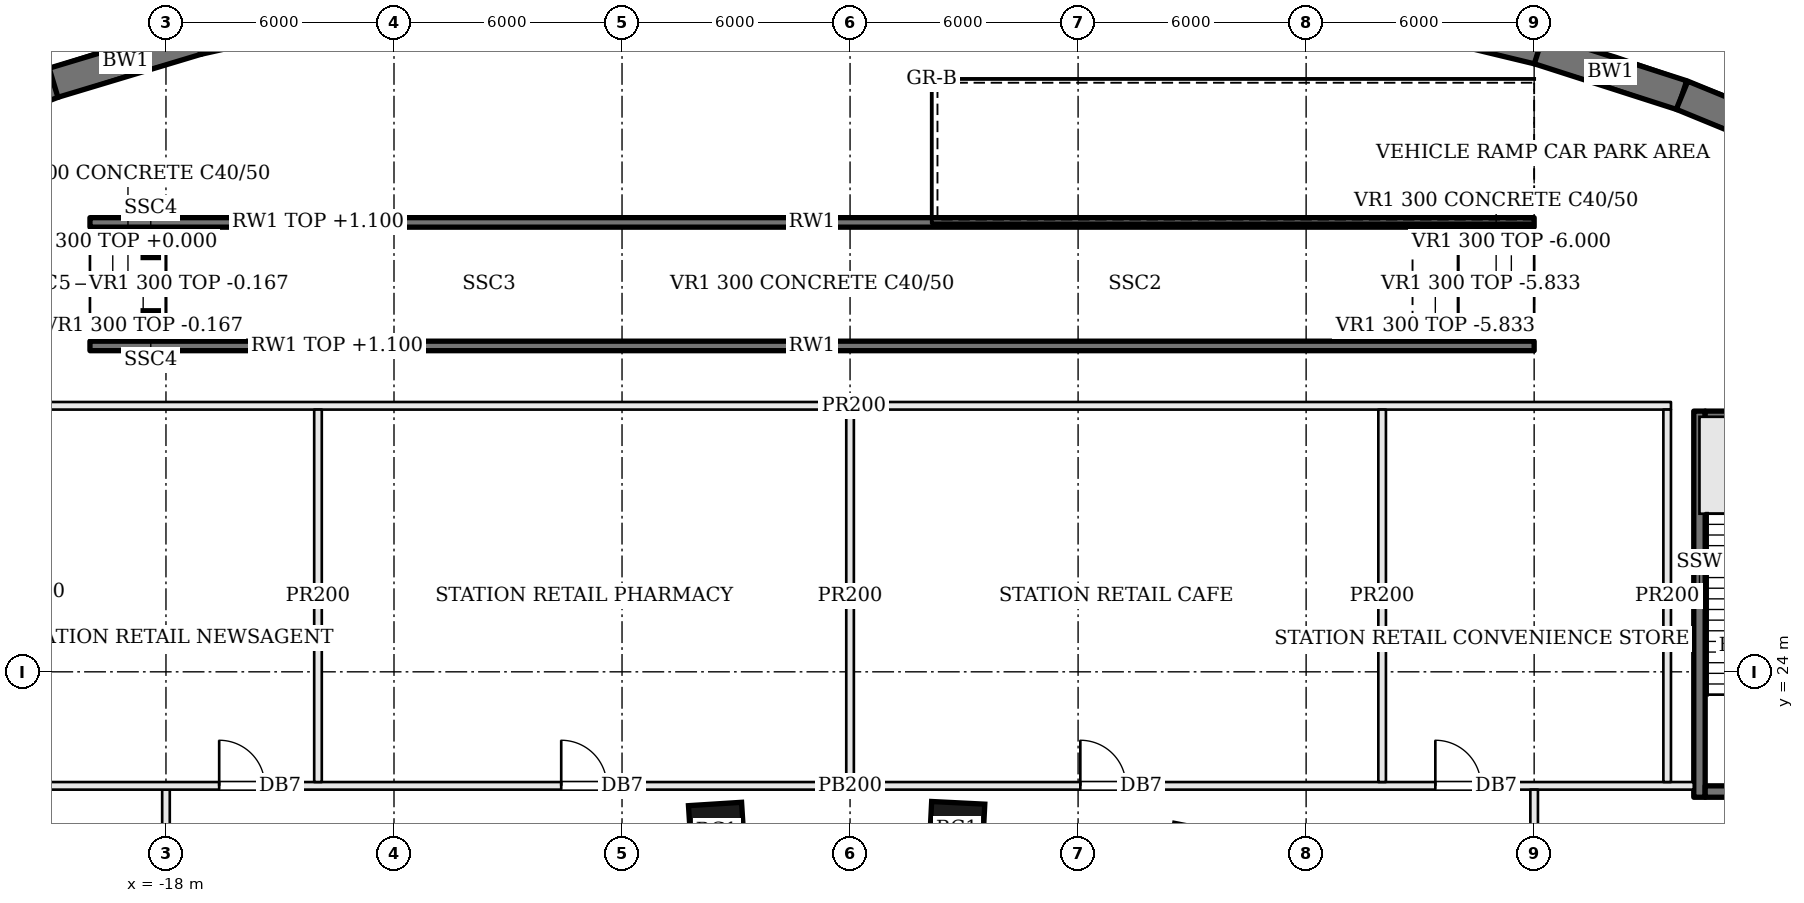
"""IFC4 building model, lengths in metres.
Left out: names, types, materials, properties, quantities, classifications, styles, units other than length and angle.
Written with IfcOpenShell. Run it as: python <this file> out.ifc"""

import sys

from ifc_helpers import new_model, si_unit, direction, frame, frame_2d, origin, origin_2d, place, context, subcontext, project, spatial, polyline, rectangle, outline, extrude, element, fill, save


model = new_model("IFC4")
c1 = context("Model", 3, precision=1e-05, world=origin(), true_north=direction((0.0, 1.0)))
c2 = subcontext(c1, "Body", "Model", "MODEL_VIEW")
j1 = project(units=[si_unit("LENGTHUNIT", "METRE"), si_unit("PLANEANGLEUNIT", "RADIAN")], contexts=[c1])
p1 = place(None, origin())
s1 = spatial("IfcSite", under=j1, at=p1, CompositionType="ELEMENT")
p2 = place(p1, origin())
s2 = spatial("IfcBuilding", under=s1, at=p2, CompositionType="ELEMENT")
p3 = place(p2, frame((0.0, 0.0, -6.0)))
s3 = spatial("IfcBuildingStorey", under=s2, at=p3, CompositionType="ELEMENT", Elevation=-6.0)
p4 = place(p3, frame((-24.644, 38.073, 0.0), z_axis=(0.0, 0.0, 1.0), x_axis=(0.932555353047, 0.361027026001, 0.0)))
e1 = element("IfcWall", 1, at=p4, inside=s3, PredefinedType="SOLIDWALL", context=c2, shape_type="SweptSolid", body=[
    extrude(rectangle(XDim=3.953, YDim=0.8, at=frame_2d((1.976, 0.0))), origin(), (0.0, 0.0, 1.0), 5.65),
])
p5 = place(p3, frame((-20.958, 39.5, 0.0), z_axis=(0.0, 0.0, 1.0), x_axis=(0.95767487473, 0.287852104928, 0.0)))
e2 = element("IfcWall", 2, at=p5, inside=s3, PredefinedType="SOLIDWALL", context=c2, shape_type="SweptSolid", body=[
    extrude(rectangle(XDim=3.953, YDim=0.8, at=frame_2d((1.977, 0.0))), origin(), (0.0, 0.0, 1.0), 5.65),
])
p6 = place(p3, frame((-17.172, 40.638, 0.0), z_axis=(0.0, 0.0, 1.0), x_axis=(0.976139122894, 0.217146063181, 0.0)))
e3 = element("IfcWall", 3, at=p6, inside=s3, PredefinedType="SOLIDWALL", context=c2, shape_type="SweptSolid", body=[
    extrude(rectangle(XDim=3.957, YDim=0.8, at=frame_2d((1.978, 0.0))), origin(), (0.0, 0.0, 1.0), 5.65),
])
p7 = place(p3, frame((14.281, 41.307, 0.0), z_axis=(0.0, 0.0, 1.0), x_axis=(0.97214528797, -0.234379049998, 0.0)))
e4 = element("IfcWall", 4, at=p7, inside=s3, PredefinedType="SOLIDWALL", context=c2, shape_type="SweptSolid", body=[
    extrude(rectangle(XDim=3.955, YDim=0.8, at=frame_2d((1.978, 0.0))), origin(), (0.0, 0.0, 1.0), 5.65),
])
p8 = place(p3, frame((18.126, 40.38, 0.0), z_axis=(0.0, 0.0, 1.0), x_axis=(0.952119733855, -0.305725387242, 0.0)))
e5 = element("IfcWall", 5, at=p8, inside=s3, PredefinedType="SOLIDWALL", context=c2, shape_type="SweptSolid", body=[
    extrude(rectangle(XDim=3.955, YDim=0.8, at=frame_2d((1.977, 0.0))), origin(), (0.0, 0.0, 1.0), 5.65),
])
p9 = place(p3, frame((21.891, 39.171, 0.0), z_axis=(0.0, 0.0, 1.0), x_axis=(0.925028349338, -0.37989808228, 0.0)))
e6 = element("IfcWall", 6, at=p9, inside=s3, PredefinedType="SOLIDWALL", context=c2, shape_type="SweptSolid", body=[
    extrude(rectangle(XDim=3.951, YDim=0.8, at=frame_2d((1.976, 0.0))), origin(), (0.0, 0.0, 1.0), 5.65),
])
for number, where, z_axis, x_axis in (
    (7, (9.094, 19.192, 0.0), (0.0, 0.0, 1.0), (-0.981, 0.192, 0.0)),
    (8, (2.811, 19.854, 0.0), (0.0, 0.0, 1.0), (-0.999, 0.05, 0.0)),
    (9, (-3.509, 19.824, 0.0), (0.0, 0.0, 1.0), (-0.998, -0.063, 0.0)),
):
    element("IfcColumn", number, at=place(p3, frame(where, z_axis=z_axis, x_axis=x_axis)), inside=s3, PredefinedType="COLUMN", context=c2, shape_type="SweptSolid", body=[
        extrude(rectangle(XDim=1.4, YDim=1.4, at=origin_2d()), origin(), (0.0, 0.0, 1.0), 6.0),
    ])
p10 = place(p3, frame((-18.0, 20.9, 0.0), z_axis=(0.0, 0.0, 1.0), x_axis=(0.0, -1.0, 0.0)))
e10 = element("IfcWall", 10, at=p10, inside=s3, PredefinedType="PARTITIONING", context=c2, shape_type="SweptSolid", body=[
    extrude(rectangle(XDim=6.8, YDim=0.2, at=frame_2d((3.4, 0.0))), origin(), (0.0, 0.0, 1.0), 5.148),
])
p11 = place(p10, frame((2.9, 0.0, 0.0)))
e11 = element("IfcOpeningElement", 11, at=p11, cuts=e10, PredefinedType="OPENING", context=c2, shape_type="SweptSolid", body=[
    extrude(rectangle(XDim=1.0, YDim=2.1, at=frame_2d((0.5, 1.05))), frame((0.0, 0.11, 0.0), z_axis=(0.0, -1.0, 0.0), x_axis=(1.0, 0.0, 0.0)), (0.0, 0.0, 1.0), 0.22),
])
p12 = place(p3, frame((-22.2, 21.0, 0.0), z_axis=(0.0, 0.0, 1.0), x_axis=(1.0, 0.0, 0.0)))
e12 = element("IfcWall", 12, at=p12, inside=s3, PredefinedType="PARTITIONING", context=c2, shape_type="SweptSolid", body=[
    extrude(rectangle(XDim=44.4, YDim=0.2, at=frame_2d((22.2, 0.0))), origin(), (0.0, 0.0, 1.0), 5.148),
])
p13 = place(p12, frame((5.6, 0.0, 0.0)))
e13 = element("IfcOpeningElement", 13, at=p13, cuts=e12, PredefinedType="OPENING", context=c2, shape_type="SweptSolid", body=[
    extrude(rectangle(XDim=1.2, YDim=2.1, at=frame_2d((0.6, 1.05))), frame((0.0, 0.11, 0.0), z_axis=(0.0, -1.0, 0.0), x_axis=(1.0, 0.0, 0.0)), (0.0, 0.0, 1.0), 0.22),
])
p14 = place(p12, frame((14.6, 0.0, 0.0)))
e14 = element("IfcOpeningElement", 14, at=p14, cuts=e12, PredefinedType="OPENING", context=c2, shape_type="SweptSolid", body=[
    extrude(rectangle(XDim=1.2, YDim=2.1, at=frame_2d((0.6, 1.05))), frame((0.0, 0.11, 0.0), z_axis=(0.0, -1.0, 0.0), x_axis=(1.0, 0.0, 0.0)), (0.0, 0.0, 1.0), 0.22),
])
p15 = place(p12, frame((28.259, 0.0, 0.0)))
e15 = element("IfcOpeningElement", 15, at=p15, cuts=e12, PredefinedType="OPENING", context=c2, shape_type="SweptSolid", body=[
    extrude(rectangle(XDim=1.2, YDim=2.1, at=frame_2d((0.6, 1.05))), frame((0.0, 0.11, 0.0), z_axis=(0.0, -1.0, 0.0), x_axis=(1.0, 0.0, 0.0)), (0.0, 0.0, 1.0), 0.22),
])
p16 = place(p12, frame((37.6, 0.0, 0.0)))
e16 = element("IfcOpeningElement", 16, at=p16, cuts=e12, PredefinedType="OPENING", context=c2, shape_type="SweptSolid", body=[
    extrude(rectangle(XDim=1.2, YDim=2.1, at=frame_2d((0.6, 1.05))), frame((0.0, 0.11, 0.0), z_axis=(0.0, -1.0, 0.0), x_axis=(1.0, 0.0, 0.0)), (0.0, 0.0, 1.0), 0.22),
])
p17 = place(p3, frame((18.0, 14.1, 0.0), z_axis=(0.0, 0.0, 1.0), x_axis=(0.0, 1.0, 0.0)))
e17 = element("IfcWall", 17, at=p17, inside=s3, PredefinedType="PARTITIONING", context=c2, shape_type="SweptSolid", body=[
    extrude(rectangle(XDim=6.8, YDim=0.2, at=frame_2d((3.4, 0.0))), origin(), (0.0, 0.0, 1.0), 5.148),
])
p18 = place(p17, frame((2.8, 0.0, 0.0)))
e18 = element("IfcOpeningElement", 18, at=p18, cuts=e17, PredefinedType="OPENING", context=c2, shape_type="SweptSolid", body=[
    extrude(rectangle(XDim=1.2, YDim=2.1, at=frame_2d((0.6, 1.05))), frame((0.0, 0.11, 0.0), z_axis=(0.0, -1.0, 0.0), x_axis=(1.0, 0.0, 0.0)), (0.0, 0.0, 1.0), 0.22),
])
p19 = place(p3, frame((22.35, 30.86, 0.0), z_axis=(0.0, 0.0, 1.0), x_axis=(0.0, -1.0, 0.0)))
e19 = element("IfcWall", 19, at=p19, inside=s3, PredefinedType="SOLIDWALL", context=c2, shape_type="SweptSolid", body=[
    extrude(rectangle(XDim=10.16, YDim=0.3, at=frame_2d((5.08, 0.0))), origin(), (0.0, 0.0, 1.0), 5.65),
])
p20 = place(p3, frame((22.5, 20.85, 0.0), z_axis=(0.0, 0.0, 1.0), x_axis=(1.0, 0.0, 0.0)))
e20 = element("IfcWall", 20, at=p20, inside=s3, PredefinedType="SOLIDWALL", context=c2, shape_type="SweptSolid", body=[
    extrude(rectangle(XDim=5.25, YDim=0.3, at=frame_2d((2.625, 0.0))), origin(), (0.0, 0.0, 1.0), 5.65),
])
p21 = place(p3, frame((22.5, 30.71, 0.0), z_axis=(0.0, 0.0, 1.0), x_axis=(1.0, 0.0, 0.0)))
e21 = element("IfcWall", 21, at=p21, inside=s3, PredefinedType="SOLIDWALL", context=c2, shape_type="SweptSolid", body=[
    extrude(rectangle(XDim=4.95, YDim=0.3, at=frame_2d((2.475, 0.0))), origin(), (0.0, 0.0, 1.0), 5.65),
])
p22 = place(p3, frame((-21.4, 31.0, 0.0), z_axis=(0.0, 0.0, 1.0), x_axis=(1.0, 0.0, 0.0)))
e22 = element("IfcWall", 22, at=p22, inside=s3, PredefinedType="PARTITIONING", context=c2, shape_type="SweptSolid", body=[
    extrude(rectangle(XDim=43.0, YDim=0.2, at=frame_2d((21.5, 0.0))), origin(), (0.0, 0.0, 1.0), 5.134),
])
for number, where, z_axis, x_axis in (
    (23, (-14.0, 30.9, 0.0), (0.0, 0.0, 1.0), (0.0, -1.0, 0.0)),
    (24, (0.0, 30.9, 0.0), (0.0, 0.0, 1.0), (0.0, -1.0, 0.0)),
    (25, (14.0, 30.9, 0.0), (0.0, 0.0, 1.0), (0.0, -1.0, 0.0)),
    (26, (21.5, 30.9, 0.0), (0.0, 0.0, 1.0), (0.0, -1.0, 0.0)),
):
    element("IfcWall", number, at=place(p3, frame(where, z_axis=z_axis, x_axis=x_axis)), inside=s3, PredefinedType="PARTITIONING", context=c2, shape_type="SweptSolid", body=[
        extrude(rectangle(XDim=9.8, YDim=0.2, at=frame_2d((4.9, 0.0))), origin(), (0.0, 0.0, 1.0), 5.134),
    ])
for number, where, z_axis, x_axis in (
    (27, (18.0, 35.825, 0.0), (0.0, 0.0, 1.0), (-1.0, 0.0, 0.0)),
    (28, (18.0, 32.575, 0.0), (0.0, 0.0, 1.0), (-1.0, 0.0, 0.0)),
):
    element("IfcWall", number, at=place(p3, frame(where, z_axis=z_axis, x_axis=x_axis)), inside=s3, PredefinedType="SOLIDWALL", context=c2, shape_type="SweptSolid", body=[
        extrude(outline(polyline([(0.0, 0.0), (38.0, 0.0), (38.0, 7.1), (36.0, 6.933), (2.0, 1.267), (0.0, 1.1), (0.0, 0.0)])), frame((0.0, 0.125, 0.0), z_axis=(0.0, -1.0, 0.0), x_axis=(1.0, 0.0, 0.0)), (0.0, 0.0, 1.0), 0.25),
    ])
p23 = place(p3, frame((7.5, 34.2, 0.0), z_axis=(0.0, 0.0, 1.0), x_axis=(1.0, 0.0, 0.0)))
e29 = element("IfcColumn", 29, at=p23, inside=s3, PredefinedType="COLUMN", context=c2, shape_type="SweptSolid", body=[
    extrude(rectangle(XDim=0.4, YDim=0.4, at=origin_2d()), origin(), (0.0, 0.0, 1.0), 1.28),
])
p24 = place(p3, frame((-9.5, 34.2, 0.0), z_axis=(0.0, 0.0, 1.0), x_axis=(1.0, 0.0, 0.0)))
e30 = element("IfcColumn", 30, at=p24, inside=s3, PredefinedType="COLUMN", context=c2, shape_type="SweptSolid", body=[
    extrude(rectangle(XDim=0.4, YDim=0.4, at=origin_2d()), origin(), (0.0, 0.0, 1.0), 4.114),
])
for number, where, z_axis, x_axis in (
    (31, (-18.4, 35.1, 0.0), (0.0, 0.0, 1.0), (1.0, 0.0, 0.0)),
    (32, (-18.4, 33.3, 0.0), (0.0, 0.0, 1.0), (1.0, 0.0, 0.0)),
):
    element("IfcColumn", number, at=place(p3, frame(where, z_axis=z_axis, x_axis=x_axis)), inside=s3, PredefinedType="COLUMN", context=c2, shape_type="SweptSolid", body=[
        extrude(rectangle(XDim=0.4, YDim=0.4, at=origin_2d()), origin(), (0.0, 0.0, 1.0), 5.564),
    ])
p25 = place(p3, frame((-19.6, 34.2, 0.0), z_axis=(0.0, 0.0, 1.0), x_axis=(1.0, 0.0, 0.0)))
e33 = element("IfcColumn", 33, at=p25, inside=s3, PredefinedType="COLUMN", context=c2, shape_type="SweptSolid", body=[
    extrude(rectangle(XDim=0.5, YDim=0.5, at=origin_2d()), origin(), (0.0, 0.0, 1.0), 5.664),
])
p26 = place(p13, origin())
e34 = element("IfcDoor", 34, at=p26, inside=s3, OperationType="SINGLE_SWING_LEFT", PredefinedType="DOOR", context=c2, shape_type="SweptSolid", body=[
    extrude(rectangle(XDim=1.2, YDim=2.1, at=frame_2d((0.6, 1.05))), frame((0.0, 0.025, 0.0), z_axis=(0.0, -1.0, 0.0), x_axis=(1.0, 0.0, 0.0)), (0.0, 0.0, 1.0), 0.05),
])
fill(e13, e34)
p27 = place(p14, origin())
e35 = element("IfcDoor", 35, at=p27, inside=s3, OperationType="SINGLE_SWING_LEFT", PredefinedType="DOOR", context=c2, shape_type="SweptSolid", body=[
    extrude(rectangle(XDim=1.2, YDim=2.1, at=frame_2d((0.6, 1.05))), frame((0.0, 0.025, 0.0), z_axis=(0.0, -1.0, 0.0), x_axis=(1.0, 0.0, 0.0)), (0.0, 0.0, 1.0), 0.05),
])
fill(e14, e35)
p28 = place(p15, origin())
e36 = element("IfcDoor", 36, at=p28, inside=s3, OperationType="SINGLE_SWING_LEFT", PredefinedType="DOOR", context=c2, shape_type="SweptSolid", body=[
    extrude(rectangle(XDim=1.2, YDim=2.1, at=frame_2d((0.6, 1.05))), frame((0.0, 0.025, 0.0), z_axis=(0.0, -1.0, 0.0), x_axis=(1.0, 0.0, 0.0)), (0.0, 0.0, 1.0), 0.05),
])
fill(e15, e36)
p29 = place(p16, origin())
e37 = element("IfcDoor", 37, at=p29, inside=s3, OperationType="SINGLE_SWING_LEFT", PredefinedType="DOOR", context=c2, shape_type="SweptSolid", body=[
    extrude(rectangle(XDim=1.2, YDim=2.1, at=frame_2d((0.6, 1.05))), frame((0.0, 0.025, 0.0), z_axis=(0.0, -1.0, 0.0), x_axis=(1.0, 0.0, 0.0)), (0.0, 0.0, 1.0), 0.05),
])
fill(e16, e37)
save(model, sys.argv[1])
